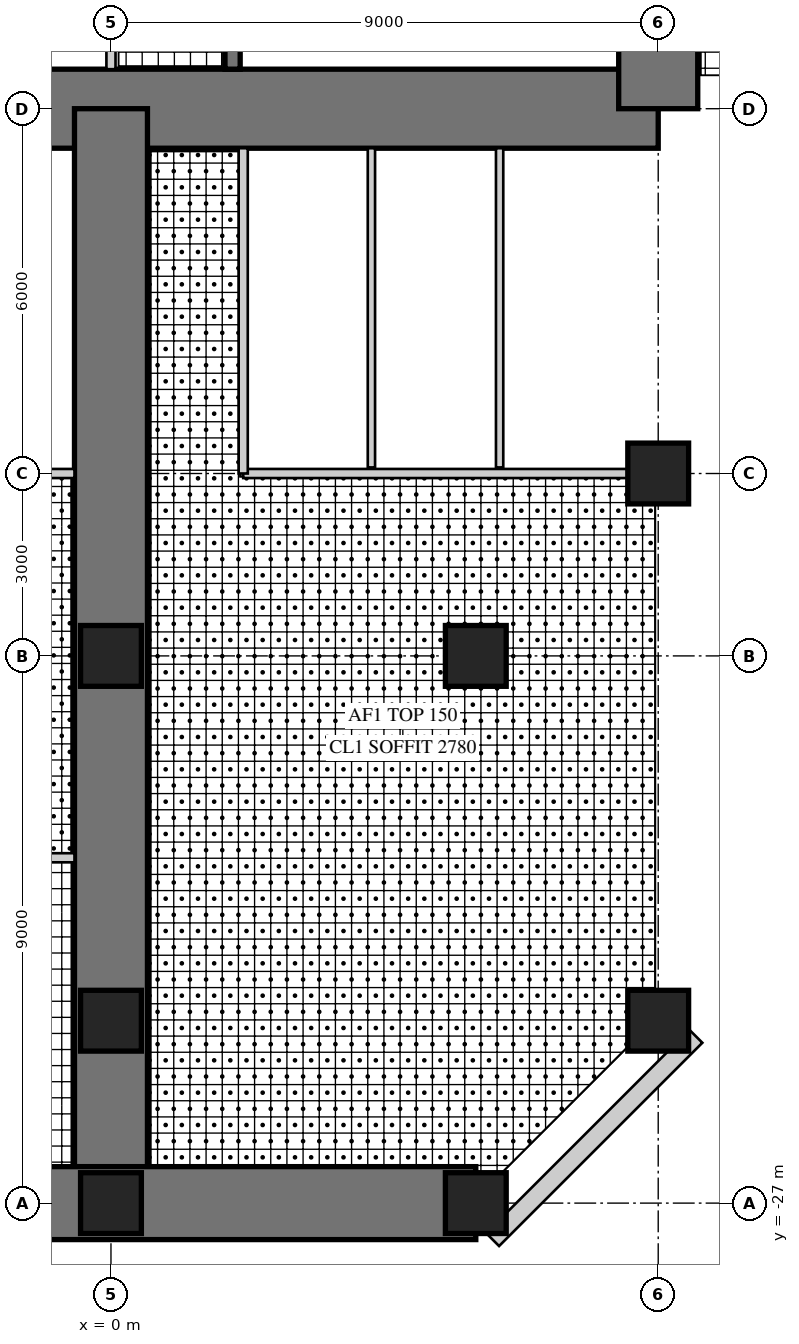
"""IFC4 building model, lengths in metres.
Left out: names, types, materials, properties, quantities, classifications, styles, units other than length and angle.
Written with IfcOpenShell. Run it as: python <this file> out.ifc"""

import sys

from ifc_helpers import new_model, si_unit, direction, frame, frame_2d, origin, origin_2d, place, context, subcontext, project, spatial, rectangle, hollow_rectangle, extrude, element, fill, save


model = new_model("IFC4")
c1 = context("Model", 3, precision=1e-05, world=origin(), true_north=direction((0.0, 1.0)))
c2 = subcontext(c1, "Body", "Model", "MODEL_VIEW")
j1 = project(units=[si_unit("LENGTHUNIT", "METRE"), si_unit("PLANEANGLEUNIT", "RADIAN")], contexts=[c1])
p1 = place(None, origin())
s1 = spatial("IfcSite", under=j1, at=p1, CompositionType="ELEMENT")
p2 = place(p1, origin())
s2 = spatial("IfcBuilding", under=s1, at=p2, CompositionType="ELEMENT")
p3 = place(p2, frame((0.0, 0.0, 136.5)))
s3 = spatial("IfcBuildingStorey", under=s2, at=p3, CompositionType="ELEMENT", Elevation=136.5)
p4 = place(p3, frame((-9.0, -9.0, 0.0), z_axis=(0.0, 0.0, 1.0), x_axis=(1.0, 0.0, 0.0)))
e1 = element("IfcWall", 1, at=p4, inside=s3, PredefinedType="SHEAR", context=c2, shape_type="SweptSolid", body=[
    extrude(rectangle(XDim=18.0, YDim=1.3, at=frame_2d((9.0, 0.0))), origin(), (0.0, 0.0, 1.0), 4.0),
])
p5 = place(p4, frame((9.8, 0.0, 0.0)))
e2 = element("IfcOpeningElement", 2, at=p5, cuts=e1, PredefinedType="OPENING", context=c2, shape_type="SweptSolid", body=[
    extrude(rectangle(XDim=1.0, YDim=2.4, at=frame_2d((0.5, 1.2))), frame((0.0, 0.66, 0.0), z_axis=(0.0, -1.0, 0.0), x_axis=(1.0, 0.0, 0.0)), (0.0, 0.0, 1.0), 1.32),
])
p6 = place(p3, frame((9.0, -9.0, 0.0), z_axis=(0.0, 0.0, 1.0), x_axis=(0.0, 1.0, 0.0)))
e3 = element("IfcWall", 3, at=p6, inside=s3, PredefinedType="SHEAR", context=c2, shape_type="SweptSolid", body=[
    extrude(rectangle(XDim=18.0, YDim=1.3, at=frame_2d((9.0, 0.0))), origin(), (0.0, 0.0, 1.0), 4.0),
])
p7 = place(p6, frame((9.8, 0.0, 0.0)))
e4 = element("IfcOpeningElement", 4, at=p7, cuts=e3, PredefinedType="OPENING", context=c2, shape_type="SweptSolid", body=[
    extrude(rectangle(XDim=1.0, YDim=2.4, at=frame_2d((0.5, 1.2))), frame((0.0, 0.66, 0.0), z_axis=(0.0, -1.0, 0.0), x_axis=(1.0, 0.0, 0.0)), (0.0, 0.0, 1.0), 1.32),
])
p8 = place(p3, frame((2.0, -1.675, 0.0), z_axis=(0.0, 0.0, 1.0), x_axis=(0.0, -1.0, 0.0)))
e5 = element("IfcWall", 5, at=p8, inside=s3, PredefinedType="SHEAR", context=c2, shape_type="SweptSolid", body=[
    extrude(rectangle(XDim=6.675, YDim=0.25, at=frame_2d((3.337, 0.0))), origin(), (0.0, 0.0, 1.0), 4.0),
])
p9 = place(p8, frame((0.725, 0.0, 0.0)))
e6 = element("IfcOpeningElement", 6, at=p9, cuts=e5, PredefinedType="OPENING", context=c2, shape_type="SweptSolid", body=[
    extrude(rectangle(XDim=1.0, YDim=2.1, at=frame_2d((0.5, 1.05))), frame((0.0, 0.135, 0.0), z_axis=(0.0, -1.0, 0.0), x_axis=(1.0, 0.0, 0.0)), (0.0, 0.0, 1.0), 0.27),
])
p10 = place(p3, frame((0.0, -9.0, 0.0), z_axis=(0.0, 0.0, 1.0), x_axis=(0.0, -1.0, 0.0)))
e7 = element("IfcWall", 7, at=p10, inside=s3, PredefinedType="SHEAR", context=c2, shape_type="SweptSolid", body=[
    extrude(rectangle(XDim=18.0, YDim=1.2, at=frame_2d((9.0, 0.0))), origin(), (0.0, 0.0, 1.0), 4.0),
])
p11 = place(p10, frame((9.8, 0.0, 0.0)))
e8 = element("IfcOpeningElement", 8, at=p11, cuts=e7, PredefinedType="OPENING", context=c2, shape_type="SweptSolid", body=[
    extrude(rectangle(XDim=1.0, YDim=2.2, at=frame_2d((0.5, 1.1))), frame((0.0, 0.61, 0.0), z_axis=(0.0, -1.0, 0.0), x_axis=(1.0, 0.0, 0.0)), (0.0, 0.0, 1.0), 1.22),
])
p12 = place(p3, frame((-6.0, -27.0, 0.0), z_axis=(0.0, 0.0, 1.0), x_axis=(1.0, 0.0, 0.0)))
e9 = element("IfcWall", 9, at=p12, inside=s3, PredefinedType="SHEAR", context=c2, shape_type="SweptSolid", body=[
    extrude(rectangle(XDim=12.0, YDim=1.2, at=frame_2d((6.0, 0.0))), origin(), (0.0, 0.0, 1.0), 4.0),
])
p13 = place(p12, frame((1.55, 0.0, 0.6)))
e10 = element("IfcOpeningElement", 10, at=p13, cuts=e9, PredefinedType="OPENING", context=c2, shape_type="SweptSolid", body=[
    extrude(rectangle(XDim=3.0, YDim=2.4, at=frame_2d((1.5, 1.2))), frame((0.0, 0.61, 0.0), z_axis=(0.0, -1.0, 0.0), x_axis=(1.0, 0.0, 0.0)), (0.0, 0.0, 1.0), 1.22),
])
p14 = place(p12, frame((7.45, 0.0, 0.6)))
e11 = element("IfcOpeningElement", 11, at=p14, cuts=e9, PredefinedType="OPENING", context=c2, shape_type="SweptSolid", body=[
    extrude(rectangle(XDim=3.0, YDim=2.4, at=frame_2d((1.5, 1.2))), frame((0.0, 0.61, 0.0), z_axis=(0.0, -1.0, 0.0), x_axis=(1.0, 0.0, 0.0)), (0.0, 0.0, 1.0), 1.22),
])
for number, where, z_axis, x_axis in (
    (12, (9.0, -15.0, 0.0), (0.0, 0.0, 1.0), (1.0, 0.0, 0.0)),
    (13, (9.0, -24.0, 0.0), (0.0, 0.0, 1.0), (1.0, 0.0, 0.0)),
    (14, (0.0, -27.0, 0.0), (0.0, 0.0, 1.0), (1.0, 0.0, 0.0)),
    (15, (6.0, -27.0, 0.0), (0.0, 0.0, 1.0), (1.0, 0.0, 0.0)),
    (16, (0.0, -18.0, 0.0), (0.0, 0.0, 1.0), (1.0, 0.0, 0.0)),
    (17, (6.0, -18.0, 0.0), (0.0, 0.0, 1.0), (1.0, 0.0, 0.0)),
    (18, (0.0, -24.0, 0.0), (0.0, 0.0, 1.0), (1.0, 0.0, 0.0)),
):
    element("IfcColumn", number, at=place(p3, frame(where, z_axis=z_axis, x_axis=x_axis)), inside=s3, PredefinedType="COLUMN", context=c2, shape_type="SweptSolid", body=[
        extrude(rectangle(XDim=1.0, YDim=1.0, at=origin_2d()), origin(), (0.0, 0.0, 1.0), 4.0),
    ])
p15 = place(p3, frame((6.277, -27.6, 0.0), z_axis=(0.0, 0.0, 1.0), x_axis=(0.707106781187, 0.707106781187, 0.0)))
e19 = element("IfcWall", 19, at=p15, inside=s3, PredefinedType="SOLIDWALL", context=c2, shape_type="SweptSolid", body=[
    extrude(rectangle(XDim=4.728, YDim=0.3, at=frame_2d((2.364, 0.0))), origin(), (0.0, 0.0, 1.0), 3.8),
])
p16 = place(p15, frame((1.914, 0.0, 0.3)))
e20 = element("IfcOpeningElement", 20, at=p16, cuts=e19, PredefinedType="OPENING", context=c2, shape_type="SweptSolid", body=[
    extrude(rectangle(XDim=0.9, YDim=2.4, at=frame_2d((0.45, 1.2))), frame((0.0, 0.16, 0.0), z_axis=(0.0, -1.0, 0.0), x_axis=(1.0, 0.0, 0.0)), (0.0, 0.0, 1.0), 0.32),
])
p17 = place(p3, frame((0.0, -5.675, 0.0), z_axis=(0.0, 0.0, 1.0), x_axis=(0.0, -1.0, 0.0)))
e21 = element("IfcWall", 21, at=p17, inside=s3, PredefinedType="PARTITIONING", context=c2, shape_type="SweptSolid", body=[
    extrude(rectangle(XDim=2.675, YDim=0.15, at=frame_2d((1.337, 0.0))), origin(), (0.0, 0.0, 1.0), 3.8),
])
p18 = place(p17, frame((0.4, 0.0, 0.0)))
e22 = element("IfcOpeningElement", 22, at=p18, cuts=e21, PredefinedType="OPENING", context=c2, shape_type="SweptSolid", body=[
    extrude(rectangle(XDim=1.0, YDim=2.1, at=frame_2d((0.5, 1.05))), frame((0.0, 0.085, 0.0), z_axis=(0.0, -1.0, 0.0), x_axis=(1.0, 0.0, 0.0)), (0.0, 0.0, 1.0), 0.17),
])
p19 = place(p3, frame((2.175, -15.0, 0.0), z_axis=(0.0, 0.0, 1.0), x_axis=(1.0, 0.0, 0.0)))
e23 = element("IfcWall", 23, at=p19, inside=s3, PredefinedType="PARTITIONING", context=c2, shape_type="SweptSolid", body=[
    extrude(rectangle(XDim=6.325, YDim=0.15, at=frame_2d((3.163, 0.0))), origin(), (0.0, 0.0, 1.0), 3.0),
])
p20 = place(p19, frame((0.554, 0.0, 0.0)))
e24 = element("IfcOpeningElement", 24, at=p20, cuts=e23, PredefinedType="OPENING", context=c2, shape_type="SweptSolid", body=[
    extrude(rectangle(XDim=1.0, YDim=2.1, at=frame_2d((0.5, 1.05))), frame((0.0, 0.085, 0.0), z_axis=(0.0, -1.0, 0.0), x_axis=(1.0, 0.0, 0.0)), (0.0, 0.0, 1.0), 0.17),
])
p21 = place(p19, frame((2.663, 0.0, 0.0)))
e25 = element("IfcOpeningElement", 25, at=p21, cuts=e23, PredefinedType="OPENING", context=c2, shape_type="SweptSolid", body=[
    extrude(rectangle(XDim=1.0, YDim=2.1, at=frame_2d((0.5, 1.05))), frame((0.0, 0.085, 0.0), z_axis=(0.0, -1.0, 0.0), x_axis=(1.0, 0.0, 0.0)), (0.0, 0.0, 1.0), 0.17),
])
p22 = place(p19, frame((4.771, 0.0, 0.0)))
e26 = element("IfcOpeningElement", 26, at=p22, cuts=e23, PredefinedType="OPENING", context=c2, shape_type="SweptSolid", body=[
    extrude(rectangle(XDim=1.0, YDim=2.1, at=frame_2d((0.5, 1.05))), frame((0.0, 0.085, 0.0), z_axis=(0.0, -1.0, 0.0), x_axis=(1.0, 0.0, 0.0)), (0.0, 0.0, 1.0), 0.17),
])
p23 = place(p3, frame((2.175, -9.65, 0.0), z_axis=(0.0, 0.0, 1.0), x_axis=(0.0, -1.0, 0.0)))
e27 = element("IfcWall", 27, at=p23, inside=s3, PredefinedType="PARTITIONING", context=c2, shape_type="SweptSolid", body=[
    extrude(rectangle(XDim=5.35, YDim=0.15, at=frame_2d((2.675, 0.0))), origin(), (0.0, 0.0, 1.0), 3.8),
])
for number, where, z_axis, x_axis in (
    (28, (4.283, -9.65, 0.0), (0.0, 0.0, 1.0), (0.0, -1.0, 0.0)),
    (29, (6.392, -9.65, 0.0), (0.0, 0.0, 1.0), (0.0, -1.0, 0.0)),
):
    element("IfcWall", number, at=place(p3, frame(where, z_axis=z_axis, x_axis=x_axis)), inside=s3, PredefinedType="PLUMBINGWALL", context=c2, shape_type="SweptSolid", body=[
        extrude(rectangle(XDim=5.25, YDim=0.12, at=frame_2d((2.625, 0.0))), origin(), (0.0, 0.0, 1.0), 3.8),
    ])
p24 = place(p3, frame((-8.5, -15.0, 0.0), z_axis=(0.0, 0.0, 1.0), x_axis=(1.0, 0.0, 0.0)))
e30 = element("IfcWall", 30, at=p24, inside=s3, PredefinedType="PARTITIONING", context=c2, shape_type="SweptSolid", body=[
    extrude(rectangle(XDim=7.9, YDim=0.15, at=frame_2d((3.95, 0.0))), origin(), (0.0, 0.0, 1.0), 3.0),
])
p25 = place(p24, frame((0.8, 0.0, 0.0)))
e31 = element("IfcOpeningElement", 31, at=p25, cuts=e30, PredefinedType="OPENING", context=c2, shape_type="SweptSolid", body=[
    extrude(rectangle(XDim=1.0, YDim=2.1, at=frame_2d((0.5, 1.05))), frame((0.0, 0.085, 0.0), z_axis=(0.0, -1.0, 0.0), x_axis=(1.0, 0.0, 0.0)), (0.0, 0.0, 1.0), 0.17),
])
p26 = place(p24, frame((3.4, 0.0, 0.0)))
e32 = element("IfcOpeningElement", 32, at=p26, cuts=e30, PredefinedType="OPENING", context=c2, shape_type="SweptSolid", body=[
    extrude(rectangle(XDim=1.0, YDim=2.1, at=frame_2d((0.5, 1.05))), frame((0.0, 0.085, 0.0), z_axis=(0.0, -1.0, 0.0), x_axis=(1.0, 0.0, 0.0)), (0.0, 0.0, 1.0), 0.17),
])
p27 = place(p24, frame((6.05, 0.0, 0.0)))
e33 = element("IfcOpeningElement", 33, at=p27, cuts=e30, PredefinedType="OPENING", context=c2, shape_type="SweptSolid", body=[
    extrude(rectangle(XDim=1.0, YDim=2.1, at=frame_2d((0.5, 1.05))), frame((0.0, 0.085, 0.0), z_axis=(0.0, -1.0, 0.0), x_axis=(1.0, 0.0, 0.0)), (0.0, 0.0, 1.0), 0.17),
])
p28 = place(p3, frame((-9.58, -21.32, 0.0), z_axis=(0.0, 0.0, 1.0), x_axis=(1.0, 0.0, 0.0)))
e34 = element("IfcWall", 34, at=p28, inside=s3, PredefinedType="PARTITIONING", context=c2, shape_type="SweptSolid", body=[
    extrude(rectangle(XDim=8.98, YDim=0.15, at=frame_2d((4.49, 0.0))), origin(), (0.0, 0.0, 1.0), 3.8),
])
p29 = place(p28, frame((7.53, 0.0, 0.0)))
e35 = element("IfcOpeningElement", 35, at=p29, cuts=e34, PredefinedType="OPENING", context=c2, shape_type="SweptSolid", body=[
    extrude(rectangle(XDim=1.0, YDim=2.2, at=frame_2d((0.5, 1.1))), frame((0.0, 0.085, 0.0), z_axis=(0.0, -1.0, 0.0), x_axis=(1.0, 0.0, 0.0)), (0.0, 0.0, 1.0), 0.17),
])
p30 = place(p14, origin())
e36 = element("IfcWindow", 36, at=p30, inside=s3, PartitioningType="SINGLE_PANEL", PredefinedType="WINDOW", context=c2, shape_type="SweptSolid", body=[
    extrude(hollow_rectangle(XDim=3.0, YDim=2.4, WallThickness=0.06, at=frame_2d((1.5, 1.2))), frame((0.0, 0.03, 0.0), z_axis=(0.0, -1.0, 0.0), x_axis=(1.0, 0.0, 0.0)), (0.0, 0.0, 1.0), 0.06),
    extrude(rectangle(XDim=2.879, YDim=2.279, at=frame_2d((1.5, 1.2))), frame((0.0, 0.03, 0.0), z_axis=(0.0, -1.0, 0.0), x_axis=(1.0, 0.0, 0.0)), (0.0, 0.0, 1.0), 0.06),
])
fill(e11, e36)
p31 = place(p16, origin())
e37 = element("IfcWindow", 37, at=p31, inside=s3, PartitioningType="SINGLE_PANEL", PredefinedType="WINDOW", context=c2, shape_type="SweptSolid", body=[
    extrude(hollow_rectangle(XDim=0.9, YDim=2.4, WallThickness=0.06, at=frame_2d((0.45, 1.2))), frame((0.0, 0.03, 0.0), z_axis=(0.0, -1.0, 0.0), x_axis=(1.0, 0.0, 0.0)), (0.0, 0.0, 1.0), 0.06),
    extrude(rectangle(XDim=0.779, YDim=2.279, at=frame_2d((0.45, 1.2))), frame((0.0, 0.03, 0.0), z_axis=(0.0, -1.0, 0.0), x_axis=(1.0, 0.0, 0.0)), (0.0, 0.0, 1.0), 0.06),
])
fill(e20, e37)
p32 = place(p20, origin())
e38 = element("IfcDoor", 38, at=p32, inside=s3, OperationType="SINGLE_SWING_LEFT", PredefinedType="DOOR", context=c2, shape_type="SweptSolid", body=[
    extrude(rectangle(XDim=1.0, YDim=2.1, at=frame_2d((0.5, 1.05))), frame((0.0, 0.025, 0.0), z_axis=(0.0, -1.0, 0.0), x_axis=(1.0, 0.0, 0.0)), (0.0, 0.0, 1.0), 0.05),
])
fill(e24, e38)
p33 = place(p21, origin())
e39 = element("IfcDoor", 39, at=p33, inside=s3, OperationType="SINGLE_SWING_LEFT", PredefinedType="DOOR", context=c2, shape_type="SweptSolid", body=[
    extrude(rectangle(XDim=1.0, YDim=2.1, at=frame_2d((0.5, 1.05))), frame((0.0, 0.025, 0.0), z_axis=(0.0, -1.0, 0.0), x_axis=(1.0, 0.0, 0.0)), (0.0, 0.0, 1.0), 0.05),
])
fill(e25, e39)
p34 = place(p22, origin())
e40 = element("IfcDoor", 40, at=p34, inside=s3, OperationType="SINGLE_SWING_LEFT", PredefinedType="DOOR", context=c2, shape_type="SweptSolid", body=[
    extrude(rectangle(XDim=1.0, YDim=2.1, at=frame_2d((0.5, 1.05))), frame((0.0, 0.025, 0.0), z_axis=(0.0, -1.0, 0.0), x_axis=(1.0, 0.0, 0.0)), (0.0, 0.0, 1.0), 0.05),
])
fill(e26, e40)
p35 = place(p11, frame((1.0, 0.0, 0.0), z_axis=(0.0, 0.0, 1.0), x_axis=(-1.0, 0.0, 0.0)))
e41 = element("IfcDoor", 41, at=p35, inside=s3, OperationType="SINGLE_SWING_LEFT", PredefinedType="DOOR", context=c2, shape_type="SweptSolid", body=[
    extrude(rectangle(XDim=1.0, YDim=2.2, at=frame_2d((0.5, 1.1))), frame((0.0, 0.025, 0.0), z_axis=(0.0, -1.0, 0.0), x_axis=(1.0, 0.0, 0.0)), (0.0, 0.0, 1.0), 0.05),
])
fill(e8, e41)
p36 = place(p5, frame((1.0, 0.0, 0.0), z_axis=(0.0, 0.0, 1.0), x_axis=(-1.0, 0.0, 0.0)))
e42 = element("IfcDoor", 42, at=p36, inside=s3, OperationType="SINGLE_SWING_RIGHT", PredefinedType="DOOR", context=c2, shape_type="SweptSolid", body=[
    extrude(rectangle(XDim=1.0, YDim=2.4, at=frame_2d((0.5, 1.2))), frame((0.0, -0.005, 0.0), z_axis=(0.0, -1.0, 0.0), x_axis=(1.0, 0.0, 0.0)), (0.0, 0.0, 1.0), 0.05),
])
fill(e2, e42)
save(model, sys.argv[1])
